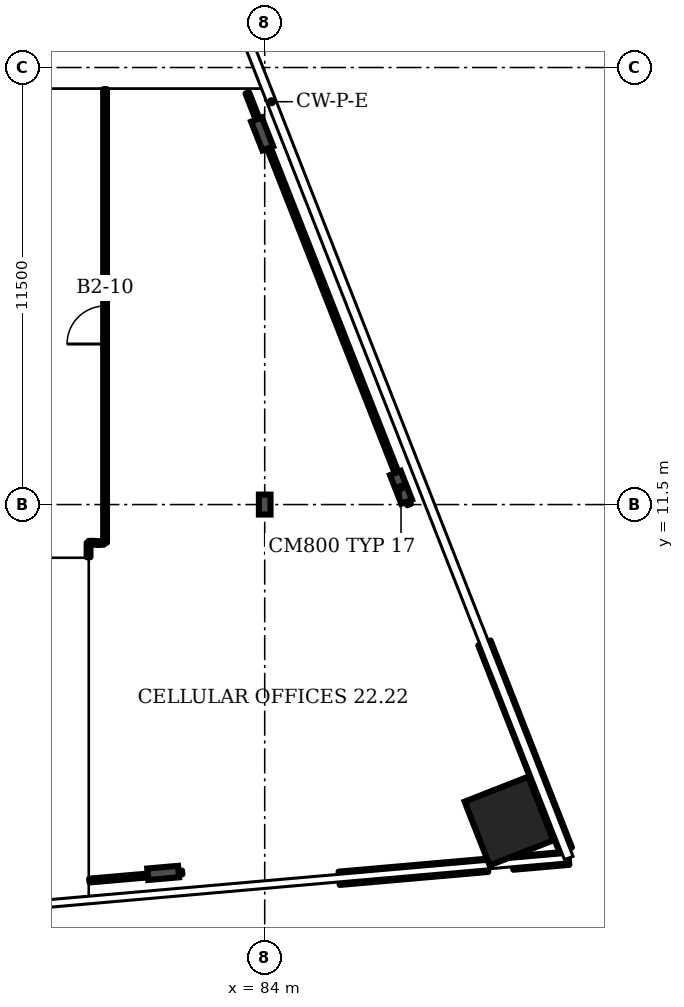
"""IFC4 building model, lengths in metres.
Left out: names, types, materials, properties, quantities, classifications, styles, units other than length and angle.
Written with IfcOpenShell. Run it as: python <this file> out.ifc"""

import sys

from ifc_helpers import new_model, si_unit, direction, frame, frame_2d, origin, origin_2d, place, context, subcontext, project, spatial, rectangle, i_section, extrude, element, fill, save


model = new_model("IFC4")
c1 = context("Model", 3, precision=1e-05, world=origin(), true_north=direction((0.0, 1.0)))
c2 = subcontext(c1, "Body", "Model", "MODEL_VIEW")
j1 = project(units=[si_unit("LENGTHUNIT", "METRE"), si_unit("PLANEANGLEUNIT", "RADIAN")], contexts=[c1])
p1 = place(None, origin())
s1 = spatial("IfcSite", under=j1, at=p1, CompositionType="ELEMENT")
p2 = place(p1, origin())
s2 = spatial("IfcBuilding", under=s1, at=p2, CompositionType="ELEMENT")
p3 = place(p2, frame((0.0, 0.0, 100.3)))
s3 = spatial("IfcBuildingStorey", under=s2, at=p3, CompositionType="ELEMENT", Elevation=100.3)
p4 = place(p3, frame((90.427, 3.174, 0.0), z_axis=(0.0, 0.0, 1.0), x_axis=(-0.365778, 0.930702, 0.0)))
e1 = element("IfcColumn", 1, at=p4, inside=s3, PredefinedType="COLUMN", context=c2, shape_type="SweptSolid", body=[
    extrude(rectangle(XDim=1.8, YDim=1.8, at=origin_2d()), origin(), (0.0, 0.0, 1.0), 3.6),
])
for number, where, z_axis, x_axis in (
    (2, (81.328, 1.808, 0.0), (0.0, 0.0, 1.0), (0.087, -0.996, 0.0)),
    (3, (87.587, 11.952, 0.0), (0.0, 0.0, 1.0), (0.931, 0.366, 0.0)),
    (4, (83.933, 21.251, 0.0), (0.0, 0.0, 1.0), (0.931, 0.366, 0.0)),
):
    element("IfcColumn", number, at=place(p3, frame(where, z_axis=z_axis, x_axis=x_axis)), inside=s3, PredefinedType="COLUMN", context=c2, shape_type="SweptSolid", body=[
        extrude(i_section(OverallWidth=0.303, OverallDepth=0.814, WebThickness=0.021, FlangeThickness=0.04, FilletRadius=0.03, at=origin_2d()), origin(), (0.0, 0.0, 1.0), 3.6),
    ])
p5 = place(p3, frame((84.0, 11.5, 0.0), z_axis=(0.0, 0.0, 1.0), x_axis=(1.0, 0.0, 0.0)))
e5 = element("IfcColumn", 5, at=p5, inside=s3, PredefinedType="COLUMN", context=c2, shape_type="SweptSolid", body=[
    extrude(i_section(OverallWidth=0.306, OverallDepth=0.524, WebThickness=0.021, FlangeThickness=0.04, FilletRadius=0.027, at=origin_2d()), origin(), (0.0, 0.0, 1.0), 3.6),
])
p6 = place(p3, frame((85.959, 1.667, 0.0), z_axis=(0.0, 0.0, 1.0), x_axis=(0.996194, 0.087167, 0.0)))
e6 = element("IfcWall", 6, at=p6, inside=s3, PredefinedType="SOLIDWALL", context=c2, shape_type="SweptSolid", body=[
    extrude(rectangle(XDim=3.921, YDim=0.35, at=frame_2d((1.96, 0.0))), origin(), (0.0, 0.0, 1.0), 1.0),
])
p7 = place(p3, frame((90.527, 2.066, 0.0), z_axis=(0.0, 0.0, 1.0), x_axis=(0.996198, 0.087157, 0.0)))
e7 = element("IfcWall", 7, at=p7, inside=s3, PredefinedType="SOLIDWALL", context=c2, shape_type="SweptSolid", body=[
    extrude(rectangle(XDim=1.479, YDim=0.35, at=frame_2d((0.74, 0.0))), origin(), (0.0, 0.0, 1.0), 1.0),
])
p8 = place(p3, frame((91.921, 2.414, 0.0), z_axis=(0.0, 0.0, 1.0), x_axis=(-0.36578, 0.930701, 0.0)))
e8 = element("IfcWall", 8, at=p8, inside=s3, PredefinedType="SOLIDWALL", context=c2, shape_type="SweptSolid", body=[
    extrude(rectangle(XDim=5.852, YDim=0.35, at=frame_2d((2.926, 0.0))), origin(), (0.0, 0.0, 1.0), 1.0),
])
p9 = place(p3, frame((79.365, 10.115, 0.0), z_axis=(0.0, 0.0, 1.0), x_axis=(0.0, 1.0, 0.0)))
e9 = element("IfcWall", 9, at=p9, inside=s3, PredefinedType="PARTITIONING", context=c2, shape_type="SweptSolid", body=[
    extrude(rectangle(XDim=0.38, YDim=0.1, at=frame_2d((0.19, 0.0))), origin(), (0.0, 0.0, 1.0), 3.2),
])
p10 = place(p3, frame((79.365, 10.495, 0.0), z_axis=(0.0, 0.0, 1.0), x_axis=(1.0, 0.0, 0.0)))
e10 = element("IfcWall", 10, at=p10, inside=s3, PredefinedType="PARTITIONING", context=c2, shape_type="SweptSolid", body=[
    extrude(rectangle(XDim=0.17, YDim=0.1, at=frame_2d((0.085, 0.0))), origin(), (0.0, 0.0, 1.0), 3.2),
])
p11 = place(p3, frame((79.386, 1.607, 0.0), z_axis=(0.0, 0.0, 1.0), x_axis=(0.996209, 0.086973, 0.0)))
e11 = element("IfcWall", 11, at=p11, inside=s3, PredefinedType="PARTITIONING", context=c2, shape_type="SweptSolid", body=[
    extrude(rectangle(XDim=2.453, YDim=0.1, at=frame_2d((1.227, 0.0))), origin(), (0.0, 0.0, 1.0), 2.58),
])
p12 = place(p3, frame((79.59, 10.485, 0.0), z_axis=(0.0, 0.0, 1.0), x_axis=(0.998455, 0.055545, 0.0)))
e12 = element("IfcWall", 12, at=p12, inside=s3, PredefinedType="PARTITIONING", context=c2, shape_type="SweptSolid", body=[
    extrude(rectangle(XDim=0.18, YDim=0.1, at=frame_2d((0.09, 0.0))), origin(), (0.0, 0.0, 1.0), 3.2),
])
p13 = place(p3, frame((79.8, 10.495, 0.0), z_axis=(0.0, 0.0, 1.0), x_axis=(0.0, 1.0, 0.0)))
e13 = element("IfcWall", 13, at=p13, inside=s3, PredefinedType="PARTITIONING", context=c2, shape_type="SweptSolid", body=[
    extrude(rectangle(XDim=11.935, YDim=0.1, at=frame_2d((5.967, 0.0))), origin(), (0.0, 0.0, 1.0), 3.2),
])
p14 = place(p13, frame((5.23, 0.0, 0.0)))
e14 = element("IfcOpeningElement", 14, at=p14, cuts=e13, PredefinedType="OPENING", context=c2, shape_type="SweptSolid", body=[
    extrude(rectangle(XDim=1.0, YDim=2.1, at=frame_2d((0.5, 1.05))), frame((0.0, 0.06, 0.0), z_axis=(0.0, -1.0, 0.0), x_axis=(1.0, 0.0, 0.0)), (0.0, 0.0, 1.0), 0.12),
])
p15 = place(p3, frame((83.96, 21.265, 0.0), z_axis=(0.0, 0.0, 1.0), x_axis=(-0.364889, 0.931052, 0.0)))
e15 = element("IfcWall", 15, at=p15, inside=s3, PredefinedType="PARTITIONING", context=c2, shape_type="SweptSolid", body=[
    extrude(rectangle(XDim=1.147, YDim=0.1, at=frame_2d((0.574, 0.0))), origin(), (0.0, 0.0, 1.0), 2.58),
])
p16 = place(p3, frame((87.8, 11.5, 0.0), z_axis=(0.0, 0.0, 1.0), x_axis=(-0.365945, 0.930635, 0.0)))
e16 = element("IfcWall", 16, at=p16, inside=s3, PredefinedType="PARTITIONING", context=c2, shape_type="SweptSolid", body=[
    extrude(rectangle(XDim=10.464, YDim=0.1, at=frame_2d((5.232, 0.0))), origin(), (0.0, 0.0, 1.0), 2.58),
])
p17 = place(p14, origin())
e17 = element("IfcDoor", 17, at=p17, inside=s3, OperationType="SINGLE_SWING_LEFT", PredefinedType="DOOR", context=c2, shape_type="SweptSolid", body=[
    extrude(rectangle(XDim=1.0, YDim=2.1, at=frame_2d((0.5, 1.05))), frame((0.0, 0.025, 0.0), z_axis=(0.0, -1.0, 0.0), x_axis=(1.0, 0.0, 0.0)), (0.0, 0.0, 1.0), 0.05),
])
fill(e14, e17)
save(model, sys.argv[1])
